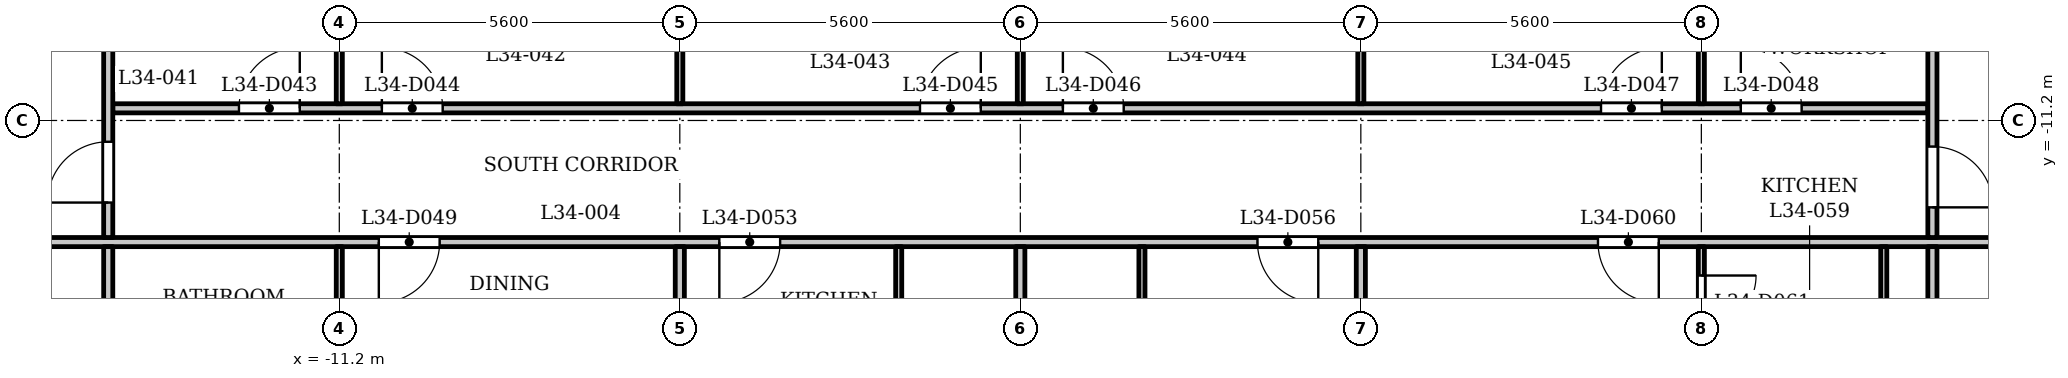
"""IFC4 building model, lengths in metres.
Left out: names, types, materials, properties, quantities, classifications, styles, units other than length and angle.
Written with IfcOpenShell. Run it as: python <this file> out.ifc"""

import sys

from ifc_helpers import new_model, si_unit, direction, frame, frame_2d, origin, place, context, subcontext, project, spatial, rectangle, extrude, element, fill, save


model = new_model("IFC4")
c1 = context("Model", 3, precision=1e-05, world=origin(), true_north=direction((0.0, 1.0)))
c2 = subcontext(c1, "Body", "Model", "MODEL_VIEW")
j1 = project(units=[si_unit("LENGTHUNIT", "METRE"), si_unit("PLANEANGLEUNIT", "RADIAN")], contexts=[c1])
p1 = place(None, origin())
s1 = spatial("IfcSite", under=j1, at=p1, CompositionType="ELEMENT")
p2 = place(p1, origin())
s2 = spatial("IfcBuilding", under=s1, at=p2, CompositionType="ELEMENT")
p3 = place(p2, frame((0.0, 0.0, 136.1)))
s3 = spatial("IfcBuildingStorey", under=s2, at=p3, CompositionType="ELEMENT", Elevation=136.1)
p4 = place(p3, frame((-17.4, -13.2, 0.0), z_axis=(0.0, 0.0, 1.0), x_axis=(1.0, 0.0, 0.0)))
e1 = element("IfcWall", 1, at=p4, inside=s3, PredefinedType="PARTITIONING", context=c2, shape_type="SweptSolid", body=[
    extrude(rectangle(XDim=34.8, YDim=0.15, at=frame_2d((17.4, 0.0))), origin(), (0.0, 0.0, 1.0), 3.2),
])
p5 = place(p4, frame((0.15, 0.0, 0.0)))
e2 = element("IfcOpeningElement", 2, at=p5, cuts=e1, PredefinedType="OPENING", context=c2, shape_type="SweptSolid", body=[
    extrude(rectangle(XDim=1.0, YDim=2.1, at=frame_2d((0.5, 1.05))), frame((0.0, 0.085, 0.0), z_axis=(0.0, -1.0, 0.0), x_axis=(1.0, 0.0, 0.0)), (0.0, 0.0, 1.0), 0.17),
])
p6 = place(p4, frame((33.55, 0.0, 0.0)))
e3 = element("IfcOpeningElement", 3, at=p6, cuts=e1, PredefinedType="OPENING", context=c2, shape_type="SweptSolid", body=[
    extrude(rectangle(XDim=1.0, YDim=2.1, at=frame_2d((0.5, 1.05))), frame((0.0, 0.085, 0.0), z_axis=(0.0, -1.0, 0.0), x_axis=(1.0, 0.0, 0.0)), (0.0, 0.0, 1.0), 0.17),
])
p7 = place(p4, frame((6.85, 0.0, 0.0)))
e4 = element("IfcOpeningElement", 4, at=p7, cuts=e1, PredefinedType="OPENING", context=c2, shape_type="SweptSolid", body=[
    extrude(rectangle(XDim=1.0, YDim=2.1, at=frame_2d((0.5, 1.05))), frame((0.0, 0.085, 0.0), z_axis=(0.0, -1.0, 0.0), x_axis=(1.0, 0.0, 0.0)), (0.0, 0.0, 1.0), 0.17),
])
p8 = place(p4, frame((12.45, 0.0, 0.0)))
e5 = element("IfcOpeningElement", 5, at=p8, cuts=e1, PredefinedType="OPENING", context=c2, shape_type="SweptSolid", body=[
    extrude(rectangle(XDim=1.0, YDim=2.1, at=frame_2d((0.5, 1.05))), frame((0.0, 0.085, 0.0), z_axis=(0.0, -1.0, 0.0), x_axis=(1.0, 0.0, 0.0)), (0.0, 0.0, 1.0), 0.17),
])
p9 = place(p4, frame((21.3, 0.0, 0.0)))
e6 = element("IfcOpeningElement", 6, at=p9, cuts=e1, PredefinedType="OPENING", context=c2, shape_type="SweptSolid", body=[
    extrude(rectangle(XDim=1.0, YDim=2.1, at=frame_2d((0.5, 1.05))), frame((0.0, 0.085, 0.0), z_axis=(0.0, -1.0, 0.0), x_axis=(1.0, 0.0, 0.0)), (0.0, 0.0, 1.0), 0.17),
])
p10 = place(p4, frame((26.9, 0.0, 0.0)))
e7 = element("IfcOpeningElement", 7, at=p10, cuts=e1, PredefinedType="OPENING", context=c2, shape_type="SweptSolid", body=[
    extrude(rectangle(XDim=1.0, YDim=2.1, at=frame_2d((0.5, 1.05))), frame((0.0, 0.085, 0.0), z_axis=(0.0, -1.0, 0.0), x_axis=(1.0, 0.0, 0.0)), (0.0, 0.0, 1.0), 0.17),
])
p11 = place(p3, frame((-14.925, -11.0, 0.0), z_axis=(0.0, 0.0, 1.0), x_axis=(1.0, 0.0, 0.0)))
e8 = element("IfcWall", 8, at=p11, inside=s3, PredefinedType="PARTITIONING", context=c2, shape_type="SweptSolid", body=[
    extrude(rectangle(XDim=29.85, YDim=0.15, at=frame_2d((14.925, 0.0))), origin(), (0.0, 0.0, 1.0), 3.2),
])
p12 = place(p11, frame((2.075, 0.0, 0.0)))
e9 = element("IfcOpeningElement", 9, at=p12, cuts=e8, PredefinedType="OPENING", context=c2, shape_type="SweptSolid", body=[
    extrude(rectangle(XDim=1.0, YDim=2.1, at=frame_2d((0.5, 1.05))), frame((0.0, 0.085, 0.0), z_axis=(0.0, -1.0, 0.0), x_axis=(1.0, 0.0, 0.0)), (0.0, 0.0, 1.0), 0.17),
])
p13 = place(p11, frame((4.425, 0.0, 0.0)))
e10 = element("IfcOpeningElement", 10, at=p13, cuts=e8, PredefinedType="OPENING", context=c2, shape_type="SweptSolid", body=[
    extrude(rectangle(XDim=1.0, YDim=2.1, at=frame_2d((0.5, 1.05))), frame((0.0, 0.085, 0.0), z_axis=(0.0, -1.0, 0.0), x_axis=(1.0, 0.0, 0.0)), (0.0, 0.0, 1.0), 0.17),
])
p14 = place(p11, frame((13.275, 0.0, 0.0)))
e11 = element("IfcOpeningElement", 11, at=p14, cuts=e8, PredefinedType="OPENING", context=c2, shape_type="SweptSolid", body=[
    extrude(rectangle(XDim=1.0, YDim=2.1, at=frame_2d((0.5, 1.05))), frame((0.0, 0.085, 0.0), z_axis=(0.0, -1.0, 0.0), x_axis=(1.0, 0.0, 0.0)), (0.0, 0.0, 1.0), 0.17),
])
p15 = place(p11, frame((15.625, 0.0, 0.0)))
e12 = element("IfcOpeningElement", 12, at=p15, cuts=e8, PredefinedType="OPENING", context=c2, shape_type="SweptSolid", body=[
    extrude(rectangle(XDim=1.0, YDim=2.1, at=frame_2d((0.5, 1.05))), frame((0.0, 0.085, 0.0), z_axis=(0.0, -1.0, 0.0), x_axis=(1.0, 0.0, 0.0)), (0.0, 0.0, 1.0), 0.17),
])
p16 = place(p11, frame((24.475, 0.0, 0.0)))
e13 = element("IfcOpeningElement", 13, at=p16, cuts=e8, PredefinedType="OPENING", context=c2, shape_type="SweptSolid", body=[
    extrude(rectangle(XDim=1.0, YDim=2.1, at=frame_2d((0.5, 1.05))), frame((0.0, 0.085, 0.0), z_axis=(0.0, -1.0, 0.0), x_axis=(1.0, 0.0, 0.0)), (0.0, 0.0, 1.0), 0.17),
])
p17 = place(p11, frame((26.774, 0.0, 0.0)))
e14 = element("IfcOpeningElement", 14, at=p17, cuts=e8, PredefinedType="OPENING", context=c2, shape_type="SweptSolid", body=[
    extrude(rectangle(XDim=1.0, YDim=2.1, at=frame_2d((0.5, 1.05))), frame((0.0, 0.085, 0.0), z_axis=(0.0, -1.0, 0.0), x_axis=(1.0, 0.0, 0.0)), (0.0, 0.0, 1.0), 0.17),
])
p18 = place(p3, frame((-15.0, -15.325, 0.0), z_axis=(0.0, 0.0, 1.0), x_axis=(0.0, 1.0, 0.0)))
e15 = element("IfcWall", 15, at=p18, inside=s3, PredefinedType="PARTITIONING", context=c2, shape_type="SweptSolid", body=[
    extrude(rectangle(XDim=2.05, YDim=0.15, at=frame_2d((1.025, 0.0))), origin(), (0.0, 0.0, 1.0), 3.2),
])
p19 = place(p3, frame((-15.0, -13.125, 0.0), z_axis=(0.0, 0.0, 1.0), x_axis=(0.0, 1.0, 0.0)))
e16 = element("IfcWall", 16, at=p19, inside=s3, PredefinedType="PARTITIONING", context=c2, shape_type="SweptSolid", body=[
    extrude(rectangle(XDim=6.356, YDim=0.15, at=frame_2d((3.178, 0.0))), origin(), (0.0, 0.0, 1.0), 3.2),
])
p20 = place(p19, frame((0.575, 0.0, 0.0)))
e17 = element("IfcOpeningElement", 17, at=p20, cuts=e16, PredefinedType="OPENING", context=c2, shape_type="SweptSolid", body=[
    extrude(rectangle(XDim=1.0, YDim=2.1, at=frame_2d((0.5, 1.05))), frame((0.0, 0.085, 0.0), z_axis=(0.0, -1.0, 0.0), x_axis=(1.0, 0.0, 0.0)), (0.0, 0.0, 1.0), 0.17),
])
p21 = place(p3, frame((-11.2, -16.75, 0.0), z_axis=(0.0, 0.0, 1.0), x_axis=(0.0, 1.0, 0.0)))
e18 = element("IfcWall", 18, at=p21, inside=s3, PredefinedType="PARTITIONING", context=c2, shape_type="SweptSolid", body=[
    extrude(rectangle(XDim=3.475, YDim=0.1, at=frame_2d((1.738, 0.0))), origin(), (0.0, 0.0, 1.0), 3.2),
])
for number, where, z_axis, x_axis in (
    (19, (-11.2, -10.925, 0.0), (0.0, 0.0, 1.0), (0.0, 1.0, 0.0)),
    (20, (-5.6, -10.925, 0.0), (0.0, 0.0, 1.0), (0.0, 1.0, 0.0)),
):
    element("IfcWall", number, at=place(p3, frame(where, z_axis=z_axis, x_axis=x_axis)), inside=s3, PredefinedType="PARTITIONING", context=c2, shape_type="SweptSolid", body=[
        extrude(rectangle(XDim=3.605, YDim=0.1, at=frame_2d((1.802, 0.0))), origin(), (0.0, 0.0, 1.0), 3.2),
    ])
p22 = place(p3, frame((-5.6, -16.75, 0.0), z_axis=(0.0, 0.0, 1.0), x_axis=(0.0, 1.0, 0.0)))
e21 = element("IfcWall", 21, at=p22, inside=s3, PredefinedType="PARTITIONING", context=c2, shape_type="SweptSolid", body=[
    extrude(rectangle(XDim=3.475, YDim=0.15, at=frame_2d((1.738, 0.0))), origin(), (0.0, 0.0, 1.0), 3.2),
])
p23 = place(p3, frame((-2.0, -16.75, 0.0), z_axis=(0.0, 0.0, 1.0), x_axis=(0.0, 1.0, 0.0)))
e22 = element("IfcWall", 22, at=p23, inside=s3, PredefinedType="PARTITIONING", context=c2, shape_type="SweptSolid", body=[
    extrude(rectangle(XDim=3.475, YDim=0.1, at=frame_2d((1.738, 0.0))), origin(), (0.0, 0.0, 1.0), 3.2),
])
p24 = place(p3, frame((0.0, -10.925, 0.0), z_axis=(0.0, 0.0, 1.0), x_axis=(0.0, 1.0, 0.0)))
e23 = element("IfcWall", 23, at=p24, inside=s3, PredefinedType="PARTITIONING", context=c2, shape_type="SweptSolid", body=[
    extrude(rectangle(XDim=3.605, YDim=0.1, at=frame_2d((1.802, 0.0))), origin(), (0.0, 0.0, 1.0), 3.2),
])
p25 = place(p3, frame((0.0, -16.75, 0.0), z_axis=(0.0, 0.0, 1.0), x_axis=(0.0, 1.0, 0.0)))
e24 = element("IfcWall", 24, at=p25, inside=s3, PredefinedType="PARTITIONING", context=c2, shape_type="SweptSolid", body=[
    extrude(rectangle(XDim=3.475, YDim=0.15, at=frame_2d((1.738, 0.0))), origin(), (0.0, 0.0, 1.0), 3.2),
])
p26 = place(p3, frame((2.0, -16.75, 0.0), z_axis=(0.0, 0.0, 1.0), x_axis=(0.0, 1.0, 0.0)))
e25 = element("IfcWall", 25, at=p26, inside=s3, PredefinedType="PARTITIONING", context=c2, shape_type="SweptSolid", body=[
    extrude(rectangle(XDim=3.475, YDim=0.1, at=frame_2d((1.738, 0.0))), origin(), (0.0, 0.0, 1.0), 3.2),
])
p27 = place(p3, frame((5.6, -10.925, 0.0), z_axis=(0.0, 0.0, 1.0), x_axis=(0.0, 1.0, 0.0)))
e26 = element("IfcWall", 26, at=p27, inside=s3, PredefinedType="PARTITIONING", context=c2, shape_type="SweptSolid", body=[
    extrude(rectangle(XDim=3.605, YDim=0.1, at=frame_2d((1.802, 0.0))), origin(), (0.0, 0.0, 1.0), 3.2),
])
p28 = place(p3, frame((5.6, -16.75, 0.0), z_axis=(0.0, 0.0, 1.0), x_axis=(0.0, 1.0, 0.0)))
e27 = element("IfcWall", 27, at=p28, inside=s3, PredefinedType="PARTITIONING", context=c2, shape_type="SweptSolid", body=[
    extrude(rectangle(XDim=3.475, YDim=0.15, at=frame_2d((1.738, 0.0))), origin(), (0.0, 0.0, 1.0), 3.2),
])
p29 = place(p3, frame((11.2, -16.75, 0.0), z_axis=(0.0, 0.0, 1.0), x_axis=(0.0, 1.0, 0.0)))
e28 = element("IfcWall", 28, at=p29, inside=s3, PredefinedType="PARTITIONING", context=c2, shape_type="SweptSolid", body=[
    extrude(rectangle(XDim=3.475, YDim=0.1, at=frame_2d((1.738, 0.0))), origin(), (0.0, 0.0, 1.0), 3.2),
])
p30 = place(p29, frame((2.1, 0.0, 0.0)))
e29 = element("IfcOpeningElement", 29, at=p30, cuts=e28, PredefinedType="OPENING", context=c2, shape_type="SweptSolid", body=[
    extrude(rectangle(XDim=0.9, YDim=2.1, at=frame_2d((0.45, 1.05))), frame((0.0, 0.06, 0.0), z_axis=(0.0, -1.0, 0.0), x_axis=(1.0, 0.0, 0.0)), (0.0, 0.0, 1.0), 0.12),
])
p31 = place(p3, frame((11.2, -10.925, 0.0), z_axis=(0.0, 0.0, 1.0), x_axis=(0.0, 1.0, 0.0)))
e30 = element("IfcWall", 30, at=p31, inside=s3, PredefinedType="PARTITIONING", context=c2, shape_type="SweptSolid", body=[
    extrude(rectangle(XDim=3.605, YDim=0.1, at=frame_2d((1.802, 0.0))), origin(), (0.0, 0.0, 1.0), 3.2),
])
p32 = place(p3, frame((14.2, -16.75, 0.0), z_axis=(0.0, 0.0, 1.0), x_axis=(0.0, 1.0, 0.0)))
e31 = element("IfcWall", 31, at=p32, inside=s3, PredefinedType="PARTITIONING", context=c2, shape_type="SweptSolid", body=[
    extrude(rectangle(XDim=3.475, YDim=0.1, at=frame_2d((1.738, 0.0))), origin(), (0.0, 0.0, 1.0), 3.2),
])
p33 = place(p3, frame((15.0, -15.325, 0.0), z_axis=(0.0, 0.0, 1.0), x_axis=(0.0, 1.0, 0.0)))
e32 = element("IfcWall", 32, at=p33, inside=s3, PredefinedType="PARTITIONING", context=c2, shape_type="SweptSolid", body=[
    extrude(rectangle(XDim=2.05, YDim=0.15, at=frame_2d((1.025, 0.0))), origin(), (0.0, 0.0, 1.0), 3.2),
])
p34 = place(p3, frame((15.0, -13.125, 0.0), z_axis=(0.0, 0.0, 1.0), x_axis=(0.0, 1.0, 0.0)))
e33 = element("IfcWall", 33, at=p34, inside=s3, PredefinedType="PARTITIONING", context=c2, shape_type="SweptSolid", body=[
    extrude(rectangle(XDim=6.356, YDim=0.15, at=frame_2d((3.178, 0.0))), origin(), (0.0, 0.0, 1.0), 3.2),
])
p35 = place(p34, frame((0.496, 0.0, 0.0)))
e34 = element("IfcOpeningElement", 34, at=p35, cuts=e33, PredefinedType="OPENING", context=c2, shape_type="SweptSolid", body=[
    extrude(rectangle(XDim=1.0, YDim=2.1, at=frame_2d((0.5, 1.05))), frame((0.0, 0.085, 0.0), z_axis=(0.0, -1.0, 0.0), x_axis=(1.0, 0.0, 0.0)), (0.0, 0.0, 1.0), 0.17),
])
p36 = place(p20, origin())
e35 = element("IfcDoor", 35, at=p36, inside=s3, OperationType="SINGLE_SWING_RIGHT", PredefinedType="DOOR", context=c2, shape_type="SweptSolid", body=[
    extrude(rectangle(XDim=1.0, YDim=2.1, at=frame_2d((0.5, 1.05))), frame((0.0, 0.025, 0.0), z_axis=(0.0, -1.0, 0.0), x_axis=(1.0, 0.0, 0.0)), (0.0, 0.0, 1.0), 0.05),
])
fill(e17, e35)
p37 = place(p35, origin())
e36 = element("IfcDoor", 36, at=p37, inside=s3, OperationType="SINGLE_SWING_LEFT", PredefinedType="DOOR", context=c2, shape_type="SweptSolid", body=[
    extrude(rectangle(XDim=1.0, YDim=2.1, at=frame_2d((0.5, 1.05))), frame((0.0, 0.025, 0.0), z_axis=(0.0, -1.0, 0.0), x_axis=(1.0, 0.0, 0.0)), (0.0, 0.0, 1.0), 0.05),
])
fill(e34, e36)
p38 = place(p12, origin())
e37 = element("IfcDoor", 37, at=p38, inside=s3, OperationType="SINGLE_SWING_LEFT", PredefinedType="DOOR", context=c2, shape_type="SweptSolid", body=[
    extrude(rectangle(XDim=1.0, YDim=2.1, at=frame_2d((0.5, 1.05))), frame((0.0, 0.025, 0.0), z_axis=(0.0, -1.0, 0.0), x_axis=(1.0, 0.0, 0.0)), (0.0, 0.0, 1.0), 0.05),
])
fill(e9, e37)
p39 = place(p13, origin())
e38 = element("IfcDoor", 38, at=p39, inside=s3, OperationType="SINGLE_SWING_RIGHT", PredefinedType="DOOR", context=c2, shape_type="SweptSolid", body=[
    extrude(rectangle(XDim=1.0, YDim=2.1, at=frame_2d((0.5, 1.05))), frame((0.0, 0.025, 0.0), z_axis=(0.0, -1.0, 0.0), x_axis=(1.0, 0.0, 0.0)), (0.0, 0.0, 1.0), 0.05),
])
fill(e10, e38)
p40 = place(p14, origin())
e39 = element("IfcDoor", 39, at=p40, inside=s3, OperationType="SINGLE_SWING_LEFT", PredefinedType="DOOR", context=c2, shape_type="SweptSolid", body=[
    extrude(rectangle(XDim=1.0, YDim=2.1, at=frame_2d((0.5, 1.05))), frame((0.0, 0.025, 0.0), z_axis=(0.0, -1.0, 0.0), x_axis=(1.0, 0.0, 0.0)), (0.0, 0.0, 1.0), 0.05),
])
fill(e11, e39)
p41 = place(p15, origin())
e40 = element("IfcDoor", 40, at=p41, inside=s3, OperationType="SINGLE_SWING_RIGHT", PredefinedType="DOOR", context=c2, shape_type="SweptSolid", body=[
    extrude(rectangle(XDim=1.0, YDim=2.1, at=frame_2d((0.5, 1.05))), frame((0.0, 0.025, 0.0), z_axis=(0.0, -1.0, 0.0), x_axis=(1.0, 0.0, 0.0)), (0.0, 0.0, 1.0), 0.05),
])
fill(e12, e40)
p42 = place(p16, origin())
e41 = element("IfcDoor", 41, at=p42, inside=s3, OperationType="SINGLE_SWING_LEFT", PredefinedType="DOOR", context=c2, shape_type="SweptSolid", body=[
    extrude(rectangle(XDim=1.0, YDim=2.1, at=frame_2d((0.5, 1.05))), frame((0.0, 0.025, 0.0), z_axis=(0.0, -1.0, 0.0), x_axis=(1.0, 0.0, 0.0)), (0.0, 0.0, 1.0), 0.05),
])
fill(e13, e41)
p43 = place(p17, origin())
e42 = element("IfcDoor", 42, at=p43, inside=s3, OperationType="SINGLE_SWING_RIGHT", PredefinedType="DOOR", context=c2, shape_type="SweptSolid", body=[
    extrude(rectangle(XDim=1.0, YDim=2.1, at=frame_2d((0.5, 1.05))), frame((0.0, 0.025, 0.0), z_axis=(0.0, -1.0, 0.0), x_axis=(1.0, 0.0, 0.0)), (0.0, 0.0, 1.0), 0.05),
])
fill(e14, e42)
p44 = place(p7, origin())
e43 = element("IfcDoor", 43, at=p44, inside=s3, OperationType="SINGLE_SWING_LEFT", PredefinedType="DOOR", context=c2, shape_type="SweptSolid", body=[
    extrude(rectangle(XDim=1.0, YDim=2.1, at=frame_2d((0.5, 1.05))), frame((0.0, 0.025, 0.0), z_axis=(0.0, -1.0, 0.0), x_axis=(1.0, 0.0, 0.0)), (0.0, 0.0, 1.0), 0.05),
])
fill(e4, e43)
p45 = place(p8, origin())
e44 = element("IfcDoor", 44, at=p45, inside=s3, OperationType="SINGLE_SWING_LEFT", PredefinedType="DOOR", context=c2, shape_type="SweptSolid", body=[
    extrude(rectangle(XDim=1.0, YDim=2.1, at=frame_2d((0.5, 1.05))), frame((0.0, 0.025, 0.0), z_axis=(0.0, -1.0, 0.0), x_axis=(1.0, 0.0, 0.0)), (0.0, 0.0, 1.0), 0.05),
])
fill(e5, e44)
p46 = place(p9, origin())
e45 = element("IfcDoor", 45, at=p46, inside=s3, OperationType="SINGLE_SWING_RIGHT", PredefinedType="DOOR", context=c2, shape_type="SweptSolid", body=[
    extrude(rectangle(XDim=1.0, YDim=2.1, at=frame_2d((0.5, 1.05))), frame((0.0, 0.025, 0.0), z_axis=(0.0, -1.0, 0.0), x_axis=(1.0, 0.0, 0.0)), (0.0, 0.0, 1.0), 0.05),
])
fill(e6, e45)
p47 = place(p10, origin())
e46 = element("IfcDoor", 46, at=p47, inside=s3, OperationType="SINGLE_SWING_RIGHT", PredefinedType="DOOR", context=c2, shape_type="SweptSolid", body=[
    extrude(rectangle(XDim=1.0, YDim=2.1, at=frame_2d((0.5, 1.05))), frame((0.0, 0.025, 0.0), z_axis=(0.0, -1.0, 0.0), x_axis=(1.0, 0.0, 0.0)), (0.0, 0.0, 1.0), 0.05),
])
fill(e7, e46)
p48 = place(p30, origin())
e47 = element("IfcDoor", 47, at=p48, inside=s3, OperationType="SINGLE_SWING_RIGHT", PredefinedType="DOOR", context=c2, shape_type="SweptSolid", body=[
    extrude(rectangle(XDim=0.9, YDim=2.1, at=frame_2d((0.45, 1.05))), frame((0.0, 0.025, 0.0), z_axis=(0.0, -1.0, 0.0), x_axis=(1.0, 0.0, 0.0)), (0.0, 0.0, 1.0), 0.05),
])
fill(e29, e47)
save(model, sys.argv[1])
